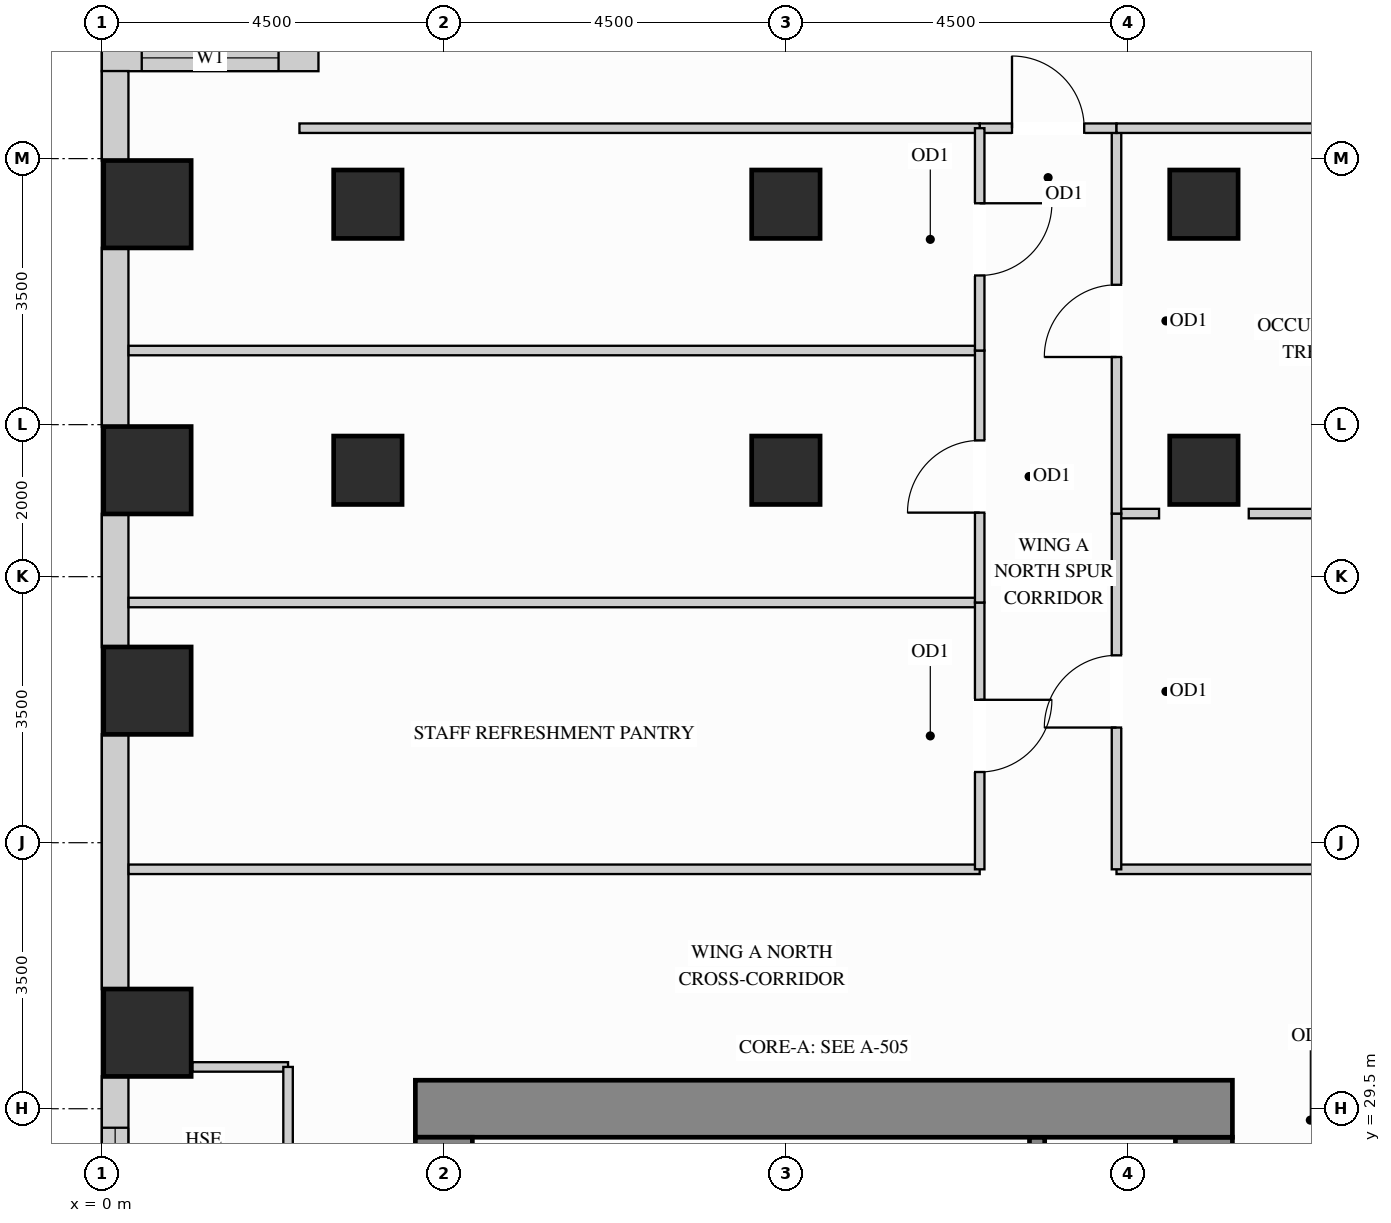
"""IFC4 building model, lengths in metres.
Left out: names, types, materials, properties, quantities, classifications, styles, units other than length and angle.
Written with IfcOpenShell. Run it as: python <this file> out.ifc"""

import sys

from ifc_helpers import new_model, si_unit, direction, frame, frame_2d, origin, origin_2d, place, context, subcontext, project, spatial, rectangle, extrude, source, transform, mapped, element, fill, save


model = new_model("IFC4")
c1 = context("Model", 3, precision=1e-05, world=origin(), true_north=direction((0.0, 1.0)))
c2 = subcontext(c1, "Body", "Model", "MODEL_VIEW")
j1 = project(units=[si_unit("LENGTHUNIT", "METRE"), si_unit("PLANEANGLEUNIT", "RADIAN")], contexts=[c1])
p1 = place(None, origin())
s1 = spatial("IfcSite", under=j1, at=p1, CompositionType="ELEMENT")
p2 = place(p1, origin())
s2 = spatial("IfcBuilding", under=s1, at=p2, CompositionType="ELEMENT")
p3 = place(p2, frame((0.0, 0.0, 91.8)))
s3 = spatial("IfcBuildingStorey", under=s2, at=p3, CompositionType="ELEMENT", Elevation=91.8)
m1 = source(origin(), c2, "Body", "SweptSolid", [
    extrude(rectangle(XDim=0.9, YDim=0.9, at=origin_2d()), origin(), (0.0, 0.0, 1.0), 3.38),
])
for number, where, z_axis, x_axis in (
    (1, (14.5, 37.9, 0.0), (0.0, 0.0, 1.0), (1.0, 0.0, 0.0)),
    (2, (14.5, 41.4, 0.0), (0.0, 0.0, 1.0), (1.0, 0.0, 0.0)),
    (3, (3.5, 37.9, 0.0), (0.0, 0.0, 1.0), (1.0, 0.0, 0.0)),
    (4, (3.5, 41.4, 0.0), (0.0, 0.0, 1.0), (1.0, 0.0, 0.0)),
    (5, (9.0, 37.9, 0.0), (0.0, 0.0, 1.0), (1.0, 0.0, 0.0)),
    (6, (9.0, 41.4, 0.0), (0.0, 0.0, 1.0), (1.0, 0.0, 0.0)),
):
    element("IfcColumn", number, at=place(p3, frame(where, z_axis=z_axis, x_axis=x_axis)), inside=s3, PredefinedType="COLUMN", context=c2, shape_type="MappedRepresentation", body=[
        mapped(m1, transform((0.0, 0.0, 0.0), x_axis=(1.0, 0.0, 0.0), y_axis=(0.0, 1.0, 0.0), z_axis=(0.0, 0.0, 1.0))),
    ])
m2 = source(origin(), c2, "Body", "SweptSolid", [
    extrude(rectangle(XDim=1.15, YDim=1.15, at=origin_2d()), origin(), (0.0, 0.0, 1.0), 3.38),
])
for number, where, z_axis, x_axis in (
    (7, (0.6, 30.5, 0.0), (0.0, 0.0, 1.0), (1.0, 0.0, 0.0)),
    (8, (0.6, 35.0, 0.0), (0.0, 0.0, 1.0), (1.0, 0.0, 0.0)),
    (9, (0.6, 37.9, 0.0), (0.0, 0.0, 1.0), (1.0, 0.0, 0.0)),
    (10, (0.6, 41.4, 0.0), (0.0, 0.0, 1.0), (1.0, 0.0, 0.0)),
):
    element("IfcColumn", number, at=place(p3, frame(where, z_axis=z_axis, x_axis=x_axis)), inside=s3, PredefinedType="COLUMN", context=c2, shape_type="MappedRepresentation", body=[
        mapped(m2, transform((0.0, 0.0, 0.0), x_axis=(1.0, 0.0, 0.0), y_axis=(0.0, 1.0, 0.0), z_axis=(0.0, 0.0, 1.0))),
    ])
m3 = source(origin(), c2, "Body", "SweptSolid", [
    extrude(rectangle(XDim=8.245, YDim=0.75, at=frame_2d((4.123, 0.0))), origin(), (0.0, 0.0, 1.0), 3.38),
])
p4 = place(p3, frame((14.5, 20.88, 0.0), z_axis=(0.0, 0.0, 1.0), x_axis=(0.0, 1.0, 0.0)))
e11 = element("IfcWall", 11, at=p4, inside=s3, PredefinedType="SHEAR", context=c2, shape_type="MappedRepresentation", body=[
    mapped(m3, transform((0.0, 0.0, 0.0), x_axis=(1.0, 0.0, 0.0), y_axis=(0.0, 1.0, 0.0), z_axis=(0.0, 0.0, 1.0))),
])
m4 = source(origin(), c2, "Body", "SweptSolid", [
    extrude(rectangle(XDim=10.75, YDim=0.75, at=frame_2d((5.375, 0.0))), origin(), (0.0, 0.0, 1.0), 3.38),
])
p5 = place(p3, frame((4.125, 29.5, 0.0), z_axis=(0.0, 0.0, 1.0), x_axis=(1.0, 0.0, 0.0)))
e12 = element("IfcWall", 12, at=p5, inside=s3, PredefinedType="SHEAR", context=c2, shape_type="MappedRepresentation", body=[
    mapped(m4, transform((0.0, 0.0, 0.0), x_axis=(1.0, 0.0, 0.0), y_axis=(0.0, 1.0, 0.0), z_axis=(0.0, 0.0, 1.0))),
])
m5 = source(origin(), c2, "Body", "SweptSolid", [
    extrude(rectangle(XDim=20.25, YDim=0.75, at=frame_2d((10.125, 0.0))), origin(), (0.0, 0.0, 1.0), 3.38),
])
p6 = place(p3, frame((4.5, 8.875, 0.0), z_axis=(0.0, 0.0, 1.0), x_axis=(0.0, 1.0, 0.0)))
e13 = element("IfcWall", 13, at=p6, inside=s3, PredefinedType="SHEAR", context=c2, shape_type="MappedRepresentation", body=[
    mapped(m5, transform((0.0, 0.0, 0.0), x_axis=(1.0, 0.0, 0.0), y_axis=(0.0, 1.0, 0.0), z_axis=(0.0, 0.0, 1.0))),
])
p7 = place(p3, frame((2.85, 43.325, 0.0), z_axis=(0.0, 0.0, 1.0), x_axis=(-1.0, 0.0, 0.0)))
e14 = element("IfcWall", 14, at=p7, inside=s3, PredefinedType="SOLIDWALL", context=c2, shape_type="SweptSolid", body=[
    extrude(rectangle(XDim=2.85, YDim=0.35, at=frame_2d((1.425, 0.0))), origin(), (0.0, 0.0, 1.0), 3.365),
])
p8 = place(p7, frame((0.525, 0.0, 0.78)))
e15 = element("IfcOpeningElement", 15, at=p8, cuts=e14, PredefinedType="OPENING", context=c2, shape_type="SweptSolid", body=[
    extrude(rectangle(XDim=1.8, YDim=2.1, at=frame_2d((0.9, 1.05))), frame((0.0, 0.185, 0.0), z_axis=(0.0, -1.0, 0.0), x_axis=(1.0, 0.0, 0.0)), (0.0, 0.0, 1.0), 0.37),
])
m6 = source(origin(), c2, "Body", "SweptSolid", [
    extrude(rectangle(XDim=1.179, YDim=0.35, at=frame_2d((0.59, 0.0))), origin(), (0.0, 0.0, 1.0), 3.365),
])
p9 = place(p3, frame((0.175, 43.152, 0.0), z_axis=(0.0, 0.0, 1.0), x_axis=(0.0, -1.0, 0.0)))
e16 = element("IfcWall", 16, at=p9, inside=s3, PredefinedType="SOLIDWALL", context=c2, shape_type="MappedRepresentation", body=[
    mapped(m6, transform((0.0, 0.0, 0.0), x_axis=(1.0, 0.0, 0.0), y_axis=(0.0, 1.0, 0.0), z_axis=(0.0, 0.0, 1.0))),
])
m7 = source(origin(), c2, "Body", "SweptSolid", [
    extrude(rectangle(XDim=2.354, YDim=0.35, at=frame_2d((1.177, 0.0))), origin(), (0.0, 0.0, 1.0), 3.365),
])
p10 = place(p3, frame((0.175, 40.827, 0.0), z_axis=(0.0, 0.0, 1.0), x_axis=(0.0, -1.0, 0.0)))
e17 = element("IfcWall", 17, at=p10, inside=s3, PredefinedType="SOLIDWALL", context=c2, shape_type="MappedRepresentation", body=[
    mapped(m7, transform((0.0, 0.0, 0.0), x_axis=(1.0, 0.0, 0.0), y_axis=(0.0, 1.0, 0.0), z_axis=(0.0, 0.0, 1.0))),
])
m8 = source(origin(), c2, "Body", "SweptSolid", [
    extrude(rectangle(XDim=1.754, YDim=0.35, at=frame_2d((0.877, 0.0))), origin(), (0.0, 0.0, 1.0), 3.365),
])
p11 = place(p3, frame((0.175, 37.327, 0.0), z_axis=(0.0, 0.0, 1.0), x_axis=(0.0, -1.0, 0.0)))
e18 = element("IfcWall", 18, at=p11, inside=s3, PredefinedType="SOLIDWALL", context=c2, shape_type="MappedRepresentation", body=[
    mapped(m8, transform((0.0, 0.0, 0.0), x_axis=(1.0, 0.0, 0.0), y_axis=(0.0, 1.0, 0.0), z_axis=(0.0, 0.0, 1.0))),
])
m9 = source(origin(), c2, "Body", "SweptSolid", [
    extrude(rectangle(XDim=3.354, YDim=0.35, at=frame_2d((1.677, 0.0))), origin(), (0.0, 0.0, 1.0), 3.365),
])
p12 = place(p3, frame((0.175, 34.427, 0.0), z_axis=(0.0, 0.0, 1.0), x_axis=(0.0, -1.0, 0.0)))
e19 = element("IfcWall", 19, at=p12, inside=s3, PredefinedType="SOLIDWALL", context=c2, shape_type="MappedRepresentation", body=[
    mapped(m9, transform((0.0, 0.0, 0.0), x_axis=(1.0, 0.0, 0.0), y_axis=(0.0, 1.0, 0.0), z_axis=(0.0, 0.0, 1.0))),
])
p13 = place(p3, frame((0.175, 29.927, 0.0), z_axis=(0.0, 0.0, 1.0), x_axis=(0.0, -1.0, 0.0)))
e20 = element("IfcWall", 20, at=p13, inside=s3, PredefinedType="SOLIDWALL", context=c2, shape_type="SweptSolid", body=[
    extrude(rectangle(XDim=2.554, YDim=0.35, at=frame_2d((1.277, 0.0))), origin(), (0.0, 0.0, 1.0), 3.365),
])
p14 = place(p13, frame((0.677, 0.0, 0.78)))
e21 = element("IfcOpeningElement", 21, at=p14, cuts=e20, PredefinedType="OPENING", context=c2, shape_type="SweptSolid", body=[
    extrude(rectangle(XDim=1.2, YDim=2.1, at=frame_2d((0.6, 1.05))), frame((0.0, 0.185, 0.0), z_axis=(0.0, -1.0, 0.0), x_axis=(1.0, 0.0, 0.0)), (0.0, 0.0, 1.0), 0.37),
])
m10 = source(origin(), c2, "Body", "SweptSolid", [
    extrude(rectangle(XDim=0.56, YDim=0.125, at=frame_2d((0.28, 0.0))), origin(), (0.0, 0.0, 1.0), 3.365),
])
p15 = place(p3, frame((13.35, 37.33, 0.0), z_axis=(0.0, 0.0, 1.0), x_axis=(1.0, 0.0, 0.0)))
e22 = element("IfcWall", 22, at=p15, inside=s3, PredefinedType="PARTITIONING", context=c2, shape_type="MappedRepresentation", body=[
    mapped(m10, transform((0.0, 0.0, 0.0), x_axis=(1.0, 0.0, 0.0), y_axis=(0.0, 1.0, 0.0), z_axis=(0.0, 0.0, 1.0))),
])
m11 = source(origin(), c2, "Body", "SweptSolid", [
    extrude(rectangle(XDim=3.32, YDim=0.125, at=frame_2d((1.66, 0.0))), origin(), (0.0, 0.0, 1.0), 3.365),
])
p16 = place(p3, frame((15.09, 37.33, 0.0), z_axis=(0.0, 0.0, 1.0), x_axis=(1.0, 0.0, 0.0)))
e23 = element("IfcWall", 23, at=p16, inside=s3, PredefinedType="PARTITIONING", context=c2, shape_type="MappedRepresentation", body=[
    mapped(m11, transform((0.0, 0.0, 0.0), x_axis=(1.0, 0.0, 0.0), y_axis=(0.0, 1.0, 0.0), z_axis=(0.0, 0.0, 1.0))),
])
m12 = source(origin(), c2, "Body", "SweptSolid", [
    extrude(rectangle(XDim=5.798, YDim=0.125, at=frame_2d((2.899, 0.0))), origin(), (0.0, 0.0, 1.0), 3.365),
])
p17 = place(p3, frame((13.35, 32.65, 0.0), z_axis=(0.0, 0.0, 1.0), x_axis=(1.0, 0.0, 0.0)))
e24 = element("IfcWall", 24, at=p17, inside=s3, PredefinedType="PARTITIONING", context=c2, shape_type="MappedRepresentation", body=[
    mapped(m12, transform((0.0, 0.0, 0.0), x_axis=(1.0, 0.0, 0.0), y_axis=(0.0, 1.0, 0.0), z_axis=(0.0, 0.0, 1.0))),
])
m13 = source(origin(), c2, "Body", "SweptSolid", [
    extrude(rectangle(XDim=11.198, YDim=0.125, at=frame_2d((5.599, 0.0))), origin(), (0.0, 0.0, 1.0), 3.365),
])
p18 = place(p3, frame((0.352, 32.65, 0.0), z_axis=(0.0, 0.0, 1.0), x_axis=(1.0, 0.0, 0.0)))
e25 = element("IfcWall", 25, at=p18, inside=s3, PredefinedType="PARTITIONING", context=c2, shape_type="MappedRepresentation", body=[
    mapped(m13, transform((0.0, 0.0, 0.0), x_axis=(1.0, 0.0, 0.0), y_axis=(0.0, 1.0, 0.0), z_axis=(0.0, 0.0, 1.0))),
])
m14 = source(origin(), c2, "Body", "SweptSolid", [
    extrude(rectangle(XDim=11.198, YDim=0.125, at=frame_2d((5.599, 0.0))), origin(), (0.0, 0.0, 1.0), 2.828),
])
for number, where, z_axis, x_axis in (
    (26, (0.352, 36.16, 0.0), (0.0, 0.0, 1.0), (1.0, 0.0, 0.0)),
    (27, (0.352, 39.475, 0.0), (0.0, 0.0, 1.0), (1.0, 0.0, 0.0)),
):
    element("IfcWall", number, at=place(p3, frame(where, z_axis=z_axis, x_axis=x_axis)), inside=s3, PredefinedType="PARTITIONING", context=c2, shape_type="MappedRepresentation", body=[
        mapped(m14, transform((0.0, 0.0, 0.0), x_axis=(1.0, 0.0, 0.0), y_axis=(0.0, 1.0, 0.0), z_axis=(0.0, 0.0, 1.0))),
    ])
m15 = source(origin(), c2, "Body", "SweptSolid", [
    extrude(rectangle(XDim=1.26, YDim=0.125, at=frame_2d((0.63, 0.0))), origin(), (0.0, 0.0, 1.0), 3.365),
])
p19 = place(p3, frame((1.19, 30.05, 0.0), z_axis=(0.0, 0.0, 1.0), x_axis=(1.0, 0.0, 0.0)))
e28 = element("IfcWall", 28, at=p19, inside=s3, PredefinedType="PARTITIONING", context=c2, shape_type="MappedRepresentation", body=[
    mapped(m15, transform((0.0, 0.0, 0.0), x_axis=(1.0, 0.0, 0.0), y_axis=(0.0, 1.0, 0.0), z_axis=(0.0, 0.0, 1.0))),
])
p20 = place(p3, frame((13.35, 32.65, 0.0), z_axis=(0.0, 0.0, 1.0), x_axis=(0.0, 1.0, 0.0)))
e29 = element("IfcWall", 29, at=p20, inside=s3, PredefinedType="PARTITIONING", context=c2, shape_type="SweptSolid", body=[
    extrude(rectangle(XDim=4.68, YDim=0.125, at=frame_2d((2.34, 0.0))), origin(), (0.0, 0.0, 1.0), 3.365),
])
p21 = place(p20, frame((1.865, 0.0, 0.0)))
e30 = element("IfcOpeningElement", 30, at=p21, cuts=e29, PredefinedType="OPENING", context=c2, shape_type="SweptSolid", body=[
    extrude(rectangle(XDim=0.95, YDim=2.15, at=frame_2d((0.475, 1.075))), frame((0.0, 0.073, 0.0), z_axis=(0.0, -1.0, 0.0), x_axis=(1.0, 0.0, 0.0)), (0.0, 0.0, 1.0), 0.145),
])
p22 = place(p3, frame((13.35, 37.33, 0.0), z_axis=(0.0, 0.0, 1.0), x_axis=(0.0, 1.0, 0.0)))
e31 = element("IfcWall", 31, at=p22, inside=s3, PredefinedType="PARTITIONING", context=c2, shape_type="SweptSolid", body=[
    extrude(rectangle(XDim=5.07, YDim=0.125, at=frame_2d((2.535, 0.0))), origin(), (0.0, 0.0, 1.0), 3.365),
])
p23 = place(p22, frame((2.06, 0.0, 0.0)))
e32 = element("IfcOpeningElement", 32, at=p23, cuts=e31, PredefinedType="OPENING", context=c2, shape_type="SweptSolid", body=[
    extrude(rectangle(XDim=0.95, YDim=2.15, at=frame_2d((0.475, 1.075))), frame((0.0, 0.073, 0.0), z_axis=(0.0, -1.0, 0.0), x_axis=(1.0, 0.0, 0.0)), (0.0, 0.0, 1.0), 0.145),
])
p24 = place(p3, frame((11.55, 42.4, 0.0), z_axis=(0.0, 0.0, 1.0), x_axis=(1.0, 0.0, 0.0)))
e33 = element("IfcWall", 33, at=p24, inside=s3, PredefinedType="PARTITIONING", context=c2, shape_type="SweptSolid", body=[
    extrude(rectangle(XDim=1.8, YDim=0.125, at=frame_2d((0.9, 0.0))), origin(), (0.0, 0.0, 1.0), 3.365),
])
p25 = place(p24, frame((0.425, 0.0, 0.0)))
e34 = element("IfcOpeningElement", 34, at=p25, cuts=e33, PredefinedType="OPENING", context=c2, shape_type="SweptSolid", body=[
    extrude(rectangle(XDim=0.95, YDim=2.15, at=frame_2d((0.475, 1.075))), frame((0.0, 0.073, 0.0), z_axis=(0.0, -1.0, 0.0), x_axis=(1.0, 0.0, 0.0)), (0.0, 0.0, 1.0), 0.145),
])
m16 = source(origin(), c2, "Body", "SweptSolid", [
    extrude(rectangle(XDim=3.55, YDim=0.125, at=frame_2d((1.775, 0.0))), origin(), (0.0, 0.0, 1.0), 3.365),
])
p26 = place(p3, frame((13.35, 42.4, 0.0), z_axis=(0.0, 0.0, 1.0), x_axis=(1.0, 0.0, 0.0)))
e35 = element("IfcWall", 35, at=p26, inside=s3, PredefinedType="PARTITIONING", context=c2, shape_type="MappedRepresentation", body=[
    mapped(m16, transform((0.0, 0.0, 0.0), x_axis=(1.0, 0.0, 0.0), y_axis=(0.0, 1.0, 0.0), z_axis=(0.0, 0.0, 1.0))),
])
m17 = source(origin(), c2, "Body", "SweptSolid", [
    extrude(rectangle(XDim=8.95, YDim=0.125, at=frame_2d((4.475, 0.0))), origin(), (0.0, 0.0, 1.0), 3.365),
])
p27 = place(p3, frame((2.6, 42.4, 0.0), z_axis=(0.0, 0.0, 1.0), x_axis=(1.0, 0.0, 0.0)))
e36 = element("IfcWall", 36, at=p27, inside=s3, PredefinedType="PARTITIONING", context=c2, shape_type="MappedRepresentation", body=[
    mapped(m17, transform((0.0, 0.0, 0.0), x_axis=(1.0, 0.0, 0.0), y_axis=(0.0, 1.0, 0.0), z_axis=(0.0, 0.0, 1.0))),
])
p28 = place(p3, frame((11.55, 32.65, 0.0), z_axis=(0.0, 0.0, 1.0), x_axis=(0.0, 1.0, 0.0)))
e37 = element("IfcWall", 37, at=p28, inside=s3, PredefinedType="PARTITIONING", context=c2, shape_type="SweptSolid", body=[
    extrude(rectangle(XDim=3.51, YDim=0.125, at=frame_2d((1.755, 0.0))), origin(), (0.0, 0.0, 1.0), 3.365),
])
p29 = place(p28, frame((1.28, 0.0, 0.0)))
e38 = element("IfcOpeningElement", 38, at=p29, cuts=e37, PredefinedType="OPENING", context=c2, shape_type="SweptSolid", body=[
    extrude(rectangle(XDim=0.95, YDim=2.15, at=frame_2d((0.475, 1.075))), frame((0.0, 0.073, 0.0), z_axis=(0.0, -1.0, 0.0), x_axis=(1.0, 0.0, 0.0)), (0.0, 0.0, 1.0), 0.145),
])
p30 = place(p3, frame((11.55, 36.16, 0.0), z_axis=(0.0, 0.0, 1.0), x_axis=(0.0, 1.0, 0.0)))
e39 = element("IfcWall", 39, at=p30, inside=s3, PredefinedType="PARTITIONING", context=c2, shape_type="SweptSolid", body=[
    extrude(rectangle(XDim=3.315, YDim=0.125, at=frame_2d((1.658, 0.0))), origin(), (0.0, 0.0, 1.0), 3.365),
])
p31 = place(p30, frame((1.183, 0.0, 0.0)))
e40 = element("IfcOpeningElement", 40, at=p31, cuts=e39, PredefinedType="OPENING", context=c2, shape_type="SweptSolid", body=[
    extrude(rectangle(XDim=0.95, YDim=2.15, at=frame_2d((0.475, 1.075))), frame((0.0, 0.073, 0.0), z_axis=(0.0, -1.0, 0.0), x_axis=(1.0, 0.0, 0.0)), (0.0, 0.0, 1.0), 0.145),
])
p32 = place(p3, frame((11.55, 39.475, 0.0), z_axis=(0.0, 0.0, 1.0), x_axis=(0.0, 1.0, 0.0)))
e41 = element("IfcWall", 41, at=p32, inside=s3, PredefinedType="PARTITIONING", context=c2, shape_type="SweptSolid", body=[
    extrude(rectangle(XDim=2.925, YDim=0.125, at=frame_2d((1.462, 0.0))), origin(), (0.0, 0.0, 1.0), 3.365),
])
p33 = place(p32, frame((0.988, 0.0, 0.0)))
e42 = element("IfcOpeningElement", 42, at=p33, cuts=e41, PredefinedType="OPENING", context=c2, shape_type="SweptSolid", body=[
    extrude(rectangle(XDim=0.95, YDim=2.15, at=frame_2d((0.475, 1.075))), frame((0.0, 0.073, 0.0), z_axis=(0.0, -1.0, 0.0), x_axis=(1.0, 0.0, 0.0)), (0.0, 0.0, 1.0), 0.145),
])
p34 = place(p3, frame((2.45, 22.6, 0.0), z_axis=(0.0, 0.0, 1.0), x_axis=(0.0, 1.0, 0.0)))
e43 = element("IfcWall", 43, at=p34, inside=s3, PredefinedType="PARTITIONING", context=c2, shape_type="SweptSolid", body=[
    extrude(rectangle(XDim=7.45, YDim=0.125, at=frame_2d((3.725, 0.0))), origin(), (0.0, 0.0, 1.0), 3.365),
])
p35 = place(p34, frame((3.25, 0.0, 0.0)))
e44 = element("IfcOpeningElement", 44, at=p35, cuts=e43, PredefinedType="OPENING", context=c2, shape_type="SweptSolid", body=[
    extrude(rectangle(XDim=0.95, YDim=2.15, at=frame_2d((0.475, 1.075))), frame((0.0, 0.073, 0.0), z_axis=(0.0, -1.0, 0.0), x_axis=(1.0, 0.0, 0.0)), (0.0, 0.0, 1.0), 0.145),
])
m18 = source(origin(), c2, "Body", "SweptSolid", [
    extrude(rectangle(XDim=3.678, YDim=0.2, at=frame_2d((1.839, 0.0))), origin(), (0.0, 0.0, 1.0), 3.38),
])
p36 = place(p3, frame((12.305, 25.445, 0.0), z_axis=(0.0, 0.0, 1.0), x_axis=(0.0, 1.0, 0.0)))
e45 = element("IfcWall", 45, at=p36, inside=s3, PredefinedType="SHEAR", context=c2, shape_type="MappedRepresentation", body=[
    mapped(m18, transform((0.0, 0.0, 0.0), x_axis=(1.0, 0.0, 0.0), y_axis=(0.0, 1.0, 0.0), z_axis=(0.0, 0.0, 1.0))),
])
m19 = source(origin(), c2, "Body", "SweptSolid", [
    extrude(rectangle(XDim=0.95, YDim=2.15, at=frame_2d((0.475, 1.075))), frame((0.0, 0.025, 0.0), z_axis=(0.0, -1.0, 0.0), x_axis=(1.0, 0.0, 0.0)), (0.0, 0.0, 1.0), 0.05),
])
p37 = place(p21, origin())
e46 = element("IfcDoor", 46, at=p37, inside=s3, OperationType="SINGLE_SWING_LEFT", PredefinedType="DOOR", context=c2, shape_type="MappedRepresentation", body=[
    mapped(m19, transform((0.0, 0.0, 0.0), x_axis=(1.0, 0.0, 0.0), y_axis=(0.0, 1.0, 0.0), z_axis=(0.0, 0.0, 1.0))),
])
fill(e30, e46)
p38 = place(p23, origin())
e47 = element("IfcDoor", 47, at=p38, inside=s3, OperationType="SINGLE_SWING_LEFT", PredefinedType="DOOR", context=c2, shape_type="MappedRepresentation", body=[
    mapped(m19, transform((0.0, 0.0, 0.0), x_axis=(1.0, 0.0, 0.0), y_axis=(0.0, 1.0, 0.0), z_axis=(0.0, 0.0, 1.0))),
])
fill(e32, e47)
p39 = place(p25, origin())
e48 = element("IfcDoor", 48, at=p39, inside=s3, OperationType="SINGLE_SWING_LEFT", PredefinedType="DOOR", context=c2, shape_type="MappedRepresentation", body=[
    mapped(m19, transform((0.0, 0.0, 0.0), x_axis=(1.0, 0.0, 0.0), y_axis=(0.0, 1.0, 0.0), z_axis=(0.0, 0.0, 1.0))),
])
fill(e34, e48)
p40 = place(p29, origin())
e49 = element("IfcDoor", 49, at=p40, inside=s3, OperationType="SINGLE_SWING_RIGHT", PredefinedType="DOOR", context=c2, shape_type="MappedRepresentation", body=[
    mapped(m19, transform((0.0, 0.0, 0.0), x_axis=(1.0, 0.0, 0.0), y_axis=(0.0, 1.0, 0.0), z_axis=(0.0, 0.0, 1.0))),
])
fill(e38, e49)
p41 = place(p31, origin())
e50 = element("IfcDoor", 50, at=p41, inside=s3, OperationType="SINGLE_SWING_LEFT", PredefinedType="DOOR", context=c2, shape_type="MappedRepresentation", body=[
    mapped(m19, transform((0.0, 0.0, 0.0), x_axis=(1.0, 0.0, 0.0), y_axis=(0.0, 1.0, 0.0), z_axis=(0.0, 0.0, 1.0))),
])
fill(e40, e50)
p42 = place(p33, origin())
e51 = element("IfcDoor", 51, at=p42, inside=s3, OperationType="SINGLE_SWING_RIGHT", PredefinedType="DOOR", context=c2, shape_type="MappedRepresentation", body=[
    mapped(m19, transform((0.0, 0.0, 0.0), x_axis=(1.0, 0.0, 0.0), y_axis=(0.0, 1.0, 0.0), z_axis=(0.0, 0.0, 1.0))),
])
fill(e42, e51)
m20 = source(origin(), c2, "Body", "SweptSolid", [
    extrude(rectangle(XDim=1.8, YDim=2.1, at=frame_2d((0.9, 1.05))), frame((0.0, 0.03, 0.0), z_axis=(0.0, -1.0, 0.0), x_axis=(1.0, 0.0, 0.0)), (0.0, 0.0, 1.0), 0.06),
])
p43 = place(p8, origin())
e52 = element("IfcWindow", 52, at=p43, inside=s3, PartitioningType="SINGLE_PANEL", PredefinedType="WINDOW", context=c2, shape_type="MappedRepresentation", body=[
    mapped(m20, transform((0.0, 0.0, 0.0), x_axis=(1.0, 0.0, 0.0), y_axis=(0.0, 1.0, 0.0), z_axis=(0.0, 0.0, 1.0))),
])
fill(e15, e52)
m21 = source(origin(), c2, "Body", "SweptSolid", [
    extrude(rectangle(XDim=1.2, YDim=2.1, at=frame_2d((0.6, 1.05))), frame((0.0, 0.03, 0.0), z_axis=(0.0, -1.0, 0.0), x_axis=(1.0, 0.0, 0.0)), (0.0, 0.0, 1.0), 0.06),
])
p44 = place(p14, origin())
e53 = element("IfcWindow", 53, at=p44, inside=s3, PartitioningType="SINGLE_PANEL", PredefinedType="WINDOW", context=c2, shape_type="MappedRepresentation", body=[
    mapped(m21, transform((0.0, 0.0, 0.0), x_axis=(1.0, 0.0, 0.0), y_axis=(0.0, 1.0, 0.0), z_axis=(0.0, 0.0, 1.0))),
])
fill(e21, e53)
save(model, sys.argv[1])
